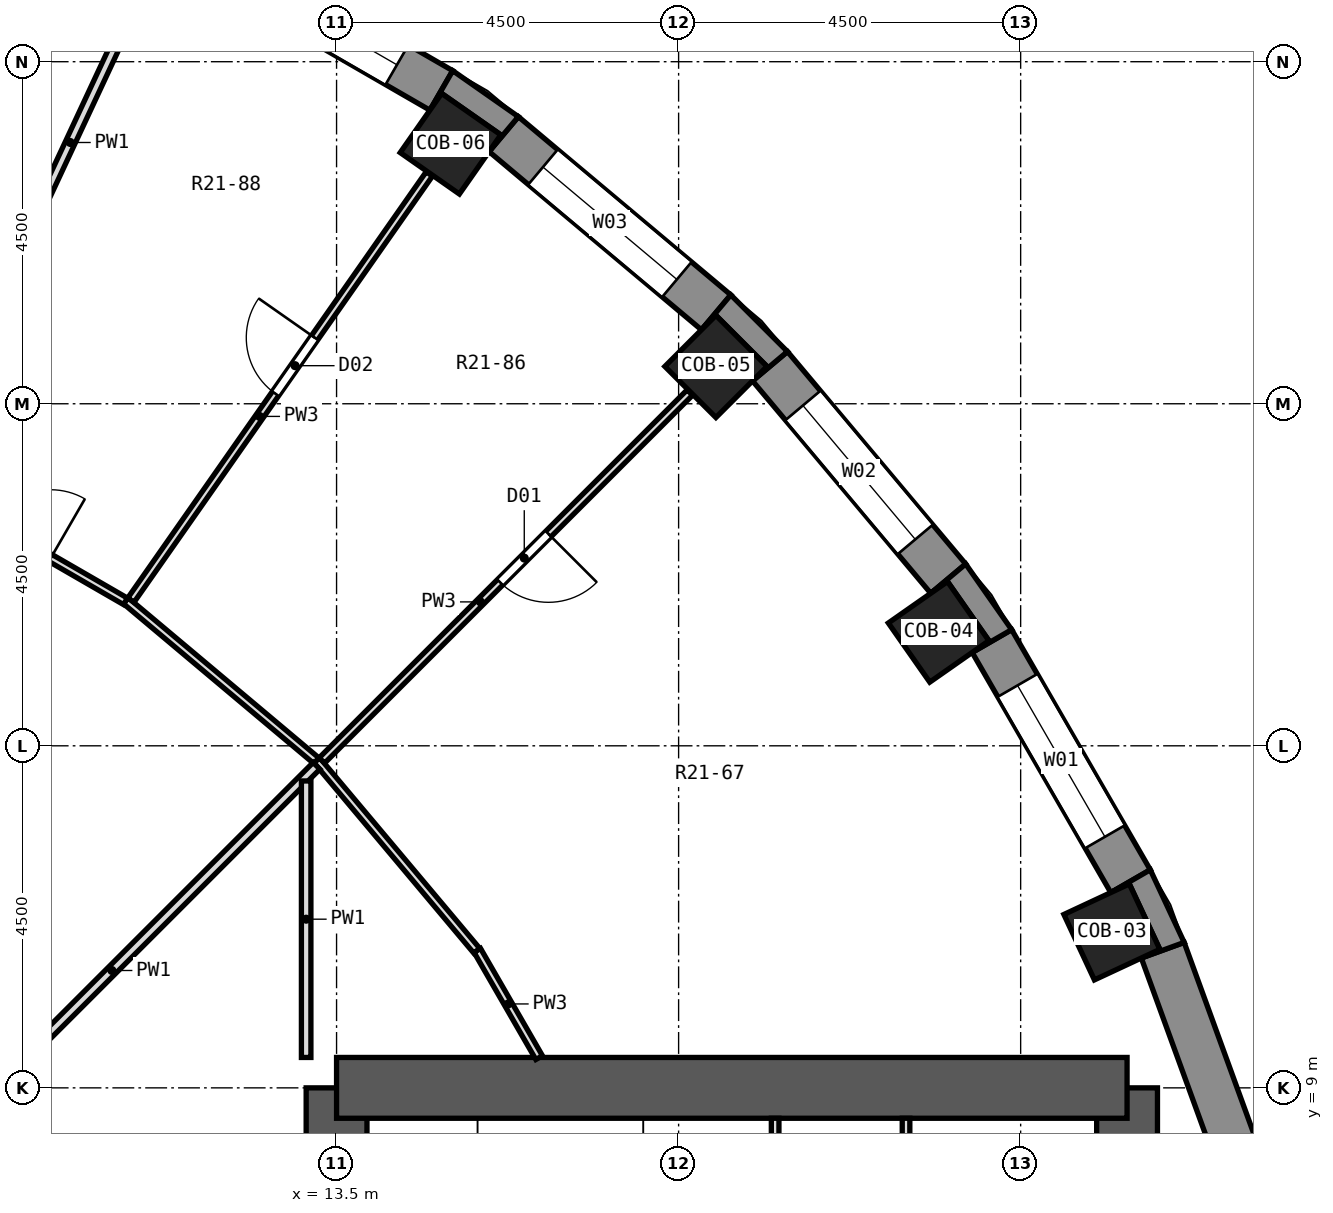
"""IFC4 building model, lengths in metres.
Left out: names, types, materials, properties, quantities, classifications, styles, units other than length and angle.
Written with IfcOpenShell. Run it as: python <this file> out.ifc"""

import sys

from ifc_helpers import new_model, si_unit, direction, frame, frame_2d, origin, origin_2d, place, context, subcontext, project, spatial, polyline, rectangle, outline, extrude, element, fill, save


model = new_model("IFC4")
c1 = context("Model", 3, precision=1e-05, world=origin(), true_north=direction((0.0, 1.0)))
c2 = subcontext(c1, "Body", "Model", "MODEL_VIEW")
j1 = project(units=[si_unit("LENGTHUNIT", "METRE"), si_unit("PLANEANGLEUNIT", "RADIAN")], contexts=[c1])
p1 = place(None, origin())
s1 = spatial("IfcSite", under=j1, at=p1, CompositionType="ELEMENT")
p2 = place(p1, origin())
s2 = spatial("IfcBuilding", under=s1, at=p2, CompositionType="ELEMENT")
p3 = place(p2, frame((0.0, 0.0, 131.5)))
s3 = spatial("IfcBuildingStorey", under=s2, at=p3, CompositionType="ELEMENT", Elevation=131.5)
for number, where, z_axis, x_axis in (
    (1, (23.7, 11.052, 0.0), (0.0, 0.0, 1.0), (0.906, 0.423, 0.0)),
    (2, (21.421, 14.999, 0.0), (0.0, 0.0, 1.0), (0.819, 0.574, 0.0)),
    (3, (18.491, 18.491, 0.0), (0.0, 0.0, 1.0), (0.707, 0.707, 0.0)),
    (4, (14.999, 21.421, 0.0), (0.0, 0.0, 1.0), (0.574, 0.819, 0.0)),
):
    element("IfcColumn", number, at=place(p3, frame(where, z_axis=z_axis, x_axis=x_axis)), inside=s3, PredefinedType="COLUMN", context=c2, shape_type="SweptSolid", body=[
        extrude(rectangle(XDim=0.95, YDim=0.95, at=origin_2d()), origin(), (0.0, 0.0, 1.0), 3.3),
    ])
p4 = place(p3, frame((13.5, -9.0, 0.0), z_axis=(0.0, 0.0, 1.0), x_axis=(0.0, 1.0, 0.0)))
e5 = element("IfcWall", 5, at=p4, inside=s3, PredefinedType="SHEAR", context=c2, shape_type="SweptSolid", body=[
    extrude(rectangle(XDim=18.0, YDim=0.8, at=frame_2d((9.0, 0.0))), origin(), (0.0, 0.0, 1.0), 3.3),
])
p5 = place(p4, frame((15.4, 0.0, 0.0)))
e6 = element("IfcOpeningElement", 6, at=p5, cuts=e5, PredefinedType="OPENING", context=c2, shape_type="SweptSolid", body=[
    extrude(rectangle(XDim=1.2, YDim=2.1, at=frame_2d((0.6, 1.05))), frame((0.0, 0.412, 0.0), z_axis=(0.0, -1.0, 0.0), x_axis=(1.0, 0.0, 0.0)), (0.0, 0.0, 1.0), 0.824),
])
p6 = place(p4, frame((1.4, 0.0, 0.0)))
e7 = element("IfcOpeningElement", 7, at=p6, cuts=e5, PredefinedType="OPENING", context=c2, shape_type="SweptSolid", body=[
    extrude(rectangle(XDim=1.2, YDim=2.1, at=frame_2d((0.6, 1.05))), frame((0.0, 0.412, 0.0), z_axis=(0.0, -1.0, 0.0), x_axis=(1.0, 0.0, 0.0)), (0.0, 0.0, 1.0), 0.824),
])
p7 = place(p4, frame((7.5, 0.0, 0.0)))
e8 = element("IfcOpeningElement", 8, at=p7, cuts=e5, PredefinedType="OPENING", context=c2, shape_type="SweptSolid", body=[
    extrude(rectangle(XDim=3.0, YDim=2.4, at=frame_2d((1.5, 1.2))), frame((0.0, 0.412, 0.0), z_axis=(0.0, -1.0, 0.0), x_axis=(1.0, 0.0, 0.0)), (0.0, 0.0, 1.0), 0.824),
])
p8 = place(p3, frame((23.9, -9.0, 0.0), z_axis=(0.0, 0.0, 1.0), x_axis=(0.0, 1.0, 0.0)))
e9 = element("IfcWall", 9, at=p8, inside=s3, PredefinedType="SHEAR", context=c2, shape_type="SweptSolid", body=[
    extrude(rectangle(XDim=18.0, YDim=0.8, at=frame_2d((9.0, 0.0))), origin(), (0.0, 0.0, 1.0), 3.3),
])
p9 = place(p3, frame((13.5, 9.0, 0.0), z_axis=(0.0, 0.0, 1.0), x_axis=(1.0, 0.0, 0.0)))
e10 = element("IfcWall", 10, at=p9, inside=s3, PredefinedType="SHEAR", context=c2, shape_type="SweptSolid", body=[
    extrude(rectangle(XDim=10.4, YDim=0.8, at=frame_2d((5.2, 0.0))), origin(), (0.0, 0.0, 1.0), 3.3),
])
p10 = place(p3, frame((25.617, 7.383, 0.0), z_axis=(0.0, 0.0, 1.0), x_axis=(-0.341990236633, 0.939703505393, 0.0)))
e11 = element("IfcWall", 11, at=p10, inside=s3, PredefinedType="SOLIDWALL", context=c2, shape_type="SweptSolid", body=[
    extrude(rectangle(XDim=3.648, YDim=0.6, at=frame_2d((1.824, 0.0))), origin(), (0.0, 0.0, 1.0), 2.8),
])
p11 = place(p3, frame((23.946, 11.719, 0.0), z_axis=(0.0, 0.0, 1.0), x_axis=(-0.499954196102, 0.866051847062, 0.0)))
e12 = element("IfcWall", 12, at=p11, inside=s3, PredefinedType="SOLIDWALL", context=c2, shape_type="SweptSolid", body=[
    extrude(rectangle(XDim=3.648, YDim=0.6, at=frame_2d((1.824, 0.0))), origin(), (0.0, 0.0, 1.0), 2.8),
])
p12 = place(p11, frame((0.674, 0.0, 0.9)))
e13 = element("IfcOpeningElement", 13, at=p12, cuts=e12, PredefinedType="OPENING", context=c2, shape_type="SweptSolid", body=[
    extrude(rectangle(XDim=2.3, YDim=1.8, at=frame_2d((1.15, 0.9))), frame((0.0, 0.312, 0.0), z_axis=(0.0, -1.0, 0.0), x_axis=(1.0, 0.0, 0.0)), (0.0, 0.0, 1.0), 0.624),
])
p13 = place(p3, frame((21.547, 15.699, 0.0), z_axis=(0.0, 0.0, 1.0), x_axis=(-0.642774476932, 0.766055462616, 0.0)))
e14 = element("IfcWall", 14, at=p13, inside=s3, PredefinedType="SOLIDWALL", context=c2, shape_type="SweptSolid", body=[
    extrude(rectangle(XDim=3.648, YDim=0.6, at=frame_2d((1.824, 0.0))), origin(), (0.0, 0.0, 1.0), 2.8),
])
p14 = place(p13, frame((0.674, 0.0, 0.9)))
e15 = element("IfcOpeningElement", 15, at=p14, cuts=e14, PredefinedType="OPENING", context=c2, shape_type="SweptSolid", body=[
    extrude(rectangle(XDim=2.3, YDim=1.8, at=frame_2d((1.15, 0.9))), frame((0.0, 0.312, 0.0), z_axis=(0.0, -1.0, 0.0), x_axis=(1.0, 0.0, 0.0)), (0.0, 0.0, 1.0), 0.624),
])
p15 = place(p3, frame((18.494, 19.202, 0.0), z_axis=(0.0, 0.0, 1.0), x_axis=(-0.766055462616, 0.642774476932, 0.0)))
e16 = element("IfcWall", 16, at=p15, inside=s3, PredefinedType="SOLIDWALL", context=c2, shape_type="SweptSolid", body=[
    extrude(rectangle(XDim=3.648, YDim=0.6, at=frame_2d((1.824, 0.0))), origin(), (0.0, 0.0, 1.0), 2.8),
])
p16 = place(p15, frame((0.674, 0.0, 0.9)))
e17 = element("IfcOpeningElement", 17, at=p16, cuts=e16, PredefinedType="OPENING", context=c2, shape_type="SweptSolid", body=[
    extrude(rectangle(XDim=2.3, YDim=1.8, at=frame_2d((1.15, 0.9))), frame((0.0, 0.312, 0.0), z_axis=(0.0, -1.0, 0.0), x_axis=(1.0, 0.0, 0.0)), (0.0, 0.0, 1.0), 0.624),
])
p17 = place(p3, frame((14.878, 22.122, 0.0), z_axis=(0.0, 0.0, 1.0), x_axis=(-0.866051847062, 0.499954196102, 0.0)))
e18 = element("IfcWall", 18, at=p17, inside=s3, PredefinedType="SOLIDWALL", context=c2, shape_type="SweptSolid", body=[
    extrude(rectangle(XDim=3.648, YDim=0.6, at=frame_2d((1.824, 0.0))), origin(), (0.0, 0.0, 1.0), 2.8),
])
p18 = place(p17, frame((0.674, 0.0, 0.9)))
e19 = element("IfcOpeningElement", 19, at=p18, cuts=e18, PredefinedType="OPENING", context=c2, shape_type="SweptSolid", body=[
    extrude(rectangle(XDim=2.3, YDim=1.8, at=frame_2d((1.15, 0.9))), frame((0.0, 0.312, 0.0), z_axis=(0.0, -1.0, 0.0), x_axis=(1.0, 0.0, 0.0)), (0.0, 0.0, 1.0), 0.624),
])
p19 = place(p3, origin())
e20 = element("IfcWall", 20, at=p19, inside=s3, PredefinedType="SOLIDWALL", context=c2, shape_type="SweptSolid", body=[
    extrude(outline(polyline([(24.651, 10.913), (24.206, 11.869), (23.686, 11.569), (23.93, 11.683), (24.331, 10.822), (24.087, 10.708), (24.651, 10.913)])), origin(), (0.0, 0.0, 1.0), 2.8),
])
p20 = place(p3, origin())
e21 = element("IfcWall", 21, at=p20, inside=s3, PredefinedType="SOLIDWALL", context=c2, shape_type="SweptSolid", body=[
    extrude(outline(polyline([(21.777, 15.892), (21.317, 15.506), (21.538, 15.661), (22.083, 14.882), (21.862, 14.728), (22.382, 15.028), (21.777, 15.892)])), origin(), (0.0, 0.0, 1.0), 2.8),
])
p21 = place(p3, origin())
e22 = element("IfcWall", 22, at=p21, inside=s3, PredefinedType="SOLIDWALL", context=c2, shape_type="SweptSolid", body=[
    extrude(outline(polyline([(19.432, 18.686), (18.686, 19.432), (18.301, 18.972), (18.491, 19.163), (19.163, 18.491), (18.972, 18.301), (19.432, 18.686)])), origin(), (0.0, 0.0, 1.0), 2.8),
])
p22 = place(p3, origin())
e23 = element("IfcWall", 23, at=p22, inside=s3, PredefinedType="SOLIDWALL", context=c2, shape_type="SweptSolid", body=[
    extrude(outline(polyline([(15.028, 22.382), (14.728, 21.862), (14.882, 22.083), (15.661, 21.538), (15.506, 21.317), (15.892, 21.777), (15.028, 22.382)])), origin(), (0.0, 0.0, 1.0), 2.8),
])
p23 = place(p3, frame((15.351, 10.81, 0.0), z_axis=(0.0, 0.0, 1.0), x_axis=(0.499618727529, -0.866245419672, 0.0)))
e24 = element("IfcWall", 24, at=p23, inside=s3, PredefinedType="PARTITIONING", context=c2, shape_type="SweptSolid", body=[
    extrude(rectangle(XDim=1.63, YDim=0.1, at=frame_2d((0.815, 0.0))), origin(), (0.0, 0.0, 1.0), 2.8),
])
for number, where, z_axis, x_axis in (
    (25, (13.239, 13.311, 0.0), (0.0, 0.0, 1.0), (0.643, -0.766, 0.0)),
    (26, (10.727, 15.409, 0.0), (0.0, 0.0, 1.0), (0.766, -0.643, 0.0)),
):
    element("IfcWall", number, at=place(p3, frame(where, z_axis=z_axis, x_axis=x_axis)), inside=s3, PredefinedType="PARTITIONING", context=c2, shape_type="SweptSolid", body=[
        extrude(rectangle(XDim=3.273, YDim=0.1, at=frame_2d((1.636, 0.0))), origin(), (0.0, 0.0, 1.0), 2.8),
    ])
p24 = place(p3, frame((7.889, 17.037, 0.0), z_axis=(0.0, 0.0, 1.0), x_axis=(0.866002935623, -0.500038913978, 0.0)))
e27 = element("IfcWall", 27, at=p24, inside=s3, PredefinedType="PARTITIONING", context=c2, shape_type="SweptSolid", body=[
    extrude(rectangle(XDim=3.272, YDim=0.1, at=frame_2d((1.636, 0.0))), origin(), (0.0, 0.0, 1.0), 2.8),
])
p25 = place(p24, frame((1.237, 0.0, 0.0)))
e28 = element("IfcOpeningElement", 28, at=p25, cuts=e27, PredefinedType="OPENING", context=c2, shape_type="SweptSolid", body=[
    extrude(rectangle(XDim=0.9, YDim=2.1, at=frame_2d((0.45, 1.05))), frame((0.0, 0.062, 0.0), z_axis=(0.0, -1.0, 0.0), x_axis=(1.0, 0.0, 0.0)), (0.0, 0.0, 1.0), 0.124),
])
p26 = place(p3, frame((13.307, 13.307, 0.0), z_axis=(0.0, 0.0, 1.0), x_axis=(0.707106781187, 0.707106781187, 0.0)))
e29 = element("IfcWall", 29, at=p26, inside=s3, PredefinedType="PARTITIONING", context=c2, shape_type="SweptSolid", body=[
    extrude(rectangle(XDim=6.846, YDim=0.1, at=frame_2d((3.423, 0.0))), origin(), (0.0, 0.0, 1.0), 2.8),
])
p27 = place(p26, frame((3.315, 0.0, 0.0)))
e30 = element("IfcOpeningElement", 30, at=p27, cuts=e29, PredefinedType="OPENING", context=c2, shape_type="SweptSolid", body=[
    extrude(rectangle(XDim=0.9, YDim=2.1, at=frame_2d((0.45, 1.05))), frame((0.0, 0.062, 0.0), z_axis=(0.0, -1.0, 0.0), x_axis=(1.0, 0.0, 0.0)), (0.0, 0.0, 1.0), 0.124),
])
p28 = place(p3, frame((7.852, 7.852, 0.0), z_axis=(0.0, 0.0, 1.0), x_axis=(0.707106781187, 0.707106781187, 0.0)))
e31 = element("IfcWall", 31, at=p28, inside=s3, PredefinedType="PARTITIONING", context=c2, shape_type="SweptSolid", body=[
    extrude(rectangle(XDim=7.615, YDim=0.125, at=frame_2d((3.807, 0.0))), origin(), (0.0, 0.0, 1.0), 2.8),
])
p29 = place(p3, frame((10.795, 15.417, 0.0), z_axis=(0.0, 0.0, 1.0), x_axis=(0.573553308079, 0.819168238393, 0.0)))
e32 = element("IfcWall", 32, at=p29, inside=s3, PredefinedType="PARTITIONING", context=c2, shape_type="SweptSolid", body=[
    extrude(rectangle(XDim=6.845, YDim=0.1, at=frame_2d((3.422, 0.0))), origin(), (0.0, 0.0, 1.0), 2.8),
])
p30 = place(p29, frame((3.315, 0.0, 0.0)))
e33 = element("IfcOpeningElement", 33, at=p30, cuts=e32, PredefinedType="OPENING", context=c2, shape_type="SweptSolid", body=[
    extrude(rectangle(XDim=0.9, YDim=2.1, at=frame_2d((0.45, 1.05))), frame((0.0, 0.062, 0.0), z_axis=(0.0, -1.0, 0.0), x_axis=(1.0, 0.0, 0.0)), (0.0, 0.0, 1.0), 0.124),
])
p31 = place(p3, frame((9.146, 19.615, 0.0), z_axis=(0.0, 0.0, 1.0), x_axis=(0.422622950513, 0.906305600612, 0.0)))
e34 = element("IfcWall", 34, at=p31, inside=s3, PredefinedType="PARTITIONING", context=c2, shape_type="SweptSolid", body=[
    extrude(rectangle(XDim=4.022, YDim=0.125, at=frame_2d((2.011, 0.0))), origin(), (0.0, 0.0, 1.0), 2.8),
])
p32 = place(p3, frame((13.1, 9.4, 0.0), z_axis=(0.0, 0.0, 1.0), x_axis=(0.0, 1.0, 0.0)))
e35 = element("IfcWall", 35, at=p32, inside=s3, PredefinedType="PARTITIONING", context=c2, shape_type="SweptSolid", body=[
    extrude(rectangle(XDim=3.638, YDim=0.125, at=frame_2d((1.819, 0.0))), origin(), (0.0, 0.0, 1.0), 2.8),
])
p33 = place(p3, frame((19.27, 5.25, 0.0), z_axis=(0.0, 0.0, 1.0), x_axis=(0.0, 1.0, 0.0)))
e36 = element("IfcWall", 36, at=p33, inside=s3, PredefinedType="PARTITIONING", context=c2, shape_type="SweptSolid", body=[
    extrude(rectangle(XDim=3.35, YDim=0.1, at=frame_2d((1.675, 0.0))), origin(), (0.0, 0.0, 1.0), 2.8),
])
p34 = place(p3, frame((20.992, 5.25, 0.0), z_axis=(0.0, 0.0, 1.0), x_axis=(0.0, 1.0, 0.0)))
e37 = element("IfcWall", 37, at=p34, inside=s3, PredefinedType="PARTITIONING", context=c2, shape_type="SweptSolid", body=[
    extrude(rectangle(XDim=3.35, YDim=0.1, at=frame_2d((1.675, 0.0))), origin(), (0.0, 0.0, 1.0), 2.8),
])
p35 = place(p34, frame((1.225, 0.0, 0.0)))
e38 = element("IfcOpeningElement", 38, at=p35, cuts=e37, PredefinedType="OPENING", context=c2, shape_type="SweptSolid", body=[
    extrude(rectangle(XDim=0.9, YDim=2.1, at=frame_2d((0.45, 1.05))), frame((0.0, 0.062, 0.0), z_axis=(0.0, -1.0, 0.0), x_axis=(1.0, 0.0, 0.0)), (0.0, 0.0, 1.0), 0.124),
])
p36 = place(p12, origin())
e39 = element("IfcWindow", 39, at=p36, inside=s3, PartitioningType="SINGLE_PANEL", PredefinedType="WINDOW", context=c2, shape_type="SweptSolid", body=[
    extrude(rectangle(XDim=2.3, YDim=1.8, at=frame_2d((1.15, 0.9))), frame((0.0, 0.18, 0.0), z_axis=(0.0, -1.0, 0.0), x_axis=(1.0, 0.0, 0.0)), (0.0, 0.0, 1.0), 0.06),
])
fill(e13, e39)
p37 = place(p14, origin())
e40 = element("IfcWindow", 40, at=p37, inside=s3, PartitioningType="SINGLE_PANEL", PredefinedType="WINDOW", context=c2, shape_type="SweptSolid", body=[
    extrude(rectangle(XDim=2.3, YDim=1.8, at=frame_2d((1.15, 0.9))), frame((0.0, 0.18, 0.0), z_axis=(0.0, -1.0, 0.0), x_axis=(1.0, 0.0, 0.0)), (0.0, 0.0, 1.0), 0.06),
])
fill(e15, e40)
p38 = place(p16, origin())
e41 = element("IfcWindow", 41, at=p38, inside=s3, PartitioningType="SINGLE_PANEL", PredefinedType="WINDOW", context=c2, shape_type="SweptSolid", body=[
    extrude(rectangle(XDim=2.3, YDim=1.8, at=frame_2d((1.15, 0.9))), frame((0.0, 0.18, 0.0), z_axis=(0.0, -1.0, 0.0), x_axis=(1.0, 0.0, 0.0)), (0.0, 0.0, 1.0), 0.06),
])
fill(e17, e41)
p39 = place(p18, origin())
e42 = element("IfcWindow", 42, at=p39, inside=s3, PartitioningType="SINGLE_PANEL", PredefinedType="WINDOW", context=c2, shape_type="SweptSolid", body=[
    extrude(rectangle(XDim=2.3, YDim=1.8, at=frame_2d((1.15, 0.9))), frame((0.0, 0.18, 0.0), z_axis=(0.0, -1.0, 0.0), x_axis=(1.0, 0.0, 0.0)), (0.0, 0.0, 1.0), 0.06),
])
fill(e19, e42)
p40 = place(p27, frame((0.9, 0.0, 0.0), z_axis=(0.0, 0.0, 1.0), x_axis=(-1.0, 0.0, 0.0)))
e43 = element("IfcDoor", 43, at=p40, inside=s3, OperationType="SINGLE_SWING_LEFT", PredefinedType="DOOR", context=c2, shape_type="SweptSolid", body=[
    extrude(rectangle(XDim=0.9, YDim=2.1, at=frame_2d((0.45, 1.05))), frame((0.0, 0.025, 0.0), z_axis=(0.0, -1.0, 0.0), x_axis=(1.0, 0.0, 0.0)), (0.0, 0.0, 1.0), 0.05),
])
fill(e30, e43)
p41 = place(p30, origin())
e44 = element("IfcDoor", 44, at=p41, inside=s3, OperationType="SINGLE_SWING_RIGHT", PredefinedType="DOOR", context=c2, shape_type="SweptSolid", body=[
    extrude(rectangle(XDim=0.9, YDim=2.1, at=frame_2d((0.45, 1.05))), frame((0.0, 0.025, 0.0), z_axis=(0.0, -1.0, 0.0), x_axis=(1.0, 0.0, 0.0)), (0.0, 0.0, 1.0), 0.05),
])
fill(e33, e44)
save(model, sys.argv[1])
